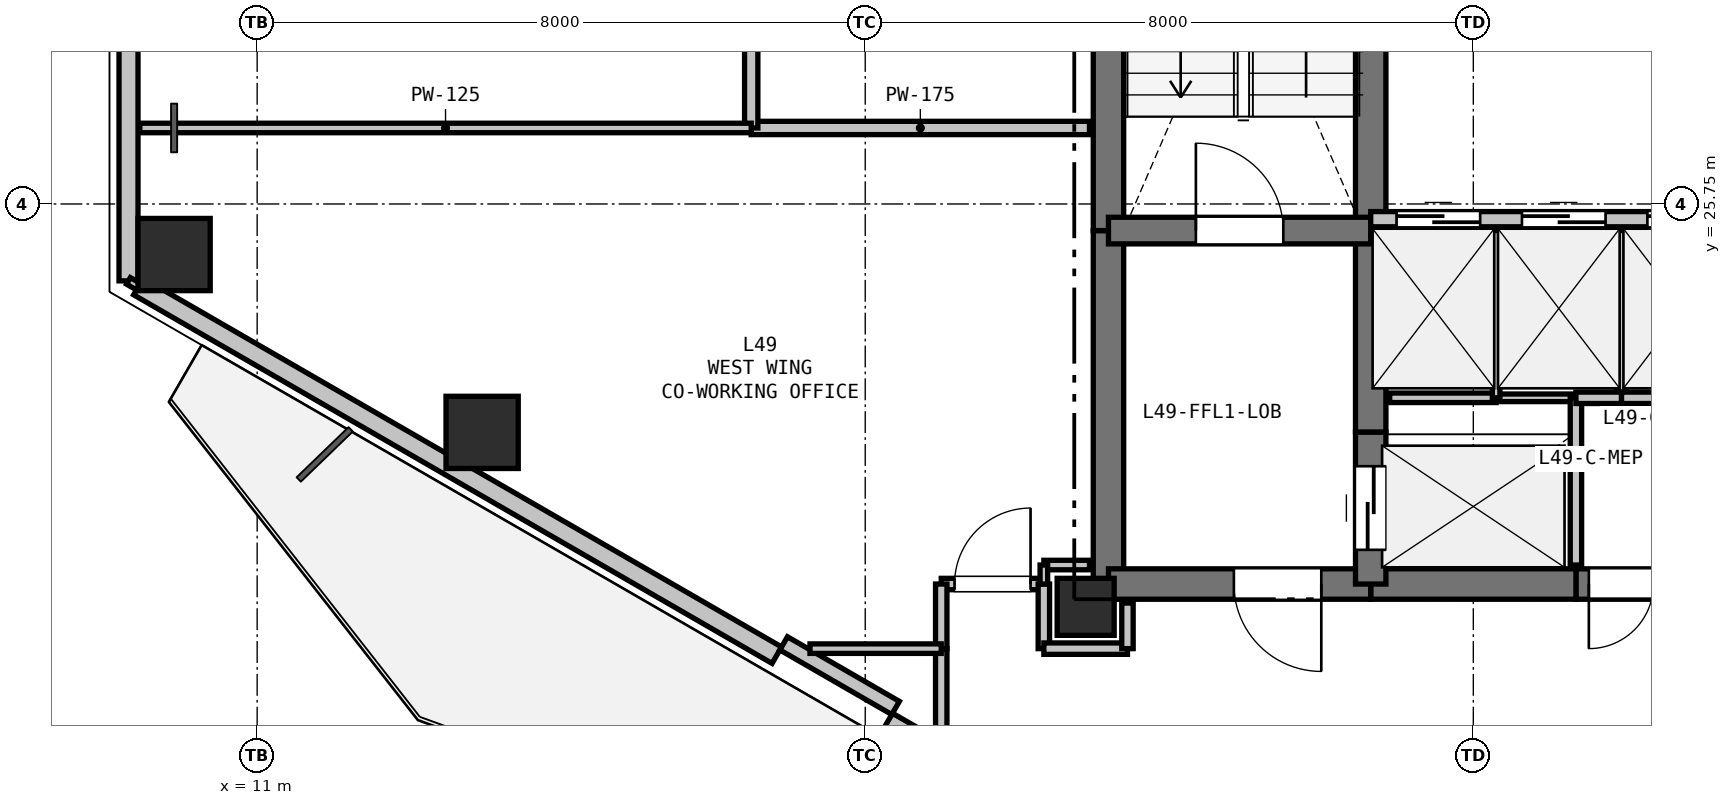
"""IFC4 building model, lengths in metres.
Left out: names, types, materials, properties, quantities, classifications, styles, units other than length and angle.
Written with IfcOpenShell. Run it as: python <this file> out.ifc"""

import sys

from ifc_helpers import new_model, si_unit, direction, frame, frame_2d, origin, origin_2d, place, context, subcontext, project, spatial, rectangle, hollow_rectangle, extrude, element, fill, save


model = new_model("IFC4")
c1 = context("Model", 3, precision=1e-05, world=origin(), true_north=direction((0.0, 1.0)))
c2 = subcontext(c1, "Body", "Model", "MODEL_VIEW")
j1 = project(units=[si_unit("LENGTHUNIT", "METRE"), si_unit("PLANEANGLEUNIT", "RADIAN")], contexts=[c1])
p1 = place(None, origin())
s1 = spatial("IfcSite", under=j1, at=p1, CompositionType="ELEMENT")
p2 = place(p1, origin())
s2 = spatial("IfcBuilding", under=s1, at=p2, CompositionType="ELEMENT")
p3 = place(p2, frame((0.0, 0.0, 178.8)))
s3 = spatial("IfcBuildingStorey", under=s2, at=p3, CompositionType="ELEMENT", Elevation=178.8)
p4 = place(p3, frame((21.9, 20.45, 0.0), z_axis=(0.0, 0.0, 1.0), x_axis=(1.0, 0.0, 0.0)))
e1 = element("IfcColumn", 1, at=p4, inside=s3, PredefinedType="COLUMN", context=c2, shape_type="SweptSolid", body=[
    extrude(rectangle(XDim=0.75, YDim=0.75, at=origin_2d()), origin(), (0.0, 0.0, 1.0), 3.3),
])
for number, where, z_axis, x_axis in (
    (2, (13.96, 22.745, 0.0), (0.0, 0.0, 1.0), (1.0, 0.0, 0.0)),
    (3, (9.907, 25.085, 0.0), (0.0, 0.0, 1.0), (1.0, 0.0, 0.0)),
):
    element("IfcColumn", number, at=place(p3, frame(where, z_axis=z_axis, x_axis=x_axis)), inside=s3, PredefinedType="COLUMN", context=c2, shape_type="SweptSolid", body=[
        extrude(hollow_rectangle(XDim=0.95, YDim=0.95, WallThickness=0.028, at=origin_2d()), origin(), (0.0, 0.0, 1.0), 3.3),
    ])
p5 = place(p3, frame((9.308, 24.738, 0.0), z_axis=(0.0, 0.0, 1.0), x_axis=(0.0, 1.0, 0.0)))
e4 = element("IfcWall", 4, at=p5, inside=s3, PredefinedType="SOLIDWALL", context=c2, shape_type="SweptSolid", body=[
    extrude(rectangle(XDim=4.023, YDim=0.25, at=frame_2d((2.012, 0.0))), origin(), (0.0, 0.0, 1.0), 2.69),
])
p6 = place(p3, frame((27.102, 14.464, 0.0), z_axis=(0.0, 0.0, 1.0), x_axis=(-0.866020680503, 0.500008180874, 0.0)))
e5 = element("IfcWall", 5, at=p6, inside=s3, PredefinedType="PARAPET", context=c2, shape_type="SweptSolid", body=[
    extrude(rectangle(XDim=8.999, YDim=0.2, at=frame_2d((4.5, 0.0))), origin(), (0.0, 0.0, 1.0), 0.2),
])
p7 = place(p3, frame((17.837, 19.814, 0.0), z_axis=(0.0, 0.0, 1.0), x_axis=(-0.866027133173, 0.499997004599, 0.0)))
e6 = element("IfcWall", 6, at=p7, inside=s3, PredefinedType="SOLIDWALL", context=c2, shape_type="SweptSolid", body=[
    extrude(rectangle(XDim=9.699, YDim=0.25, at=frame_2d((4.849, 0.0))), origin(), (0.0, 0.0, 1.0), 2.69),
])
p8 = place(p3, frame((19.399, 19.12, 0.0), z_axis=(0.0, 0.0, 1.0), x_axis=(-0.86605165483, 0.499954529098, 0.0)))
e7 = element("IfcWall", 7, at=p8, inside=s3, PredefinedType="PARAPET", context=c2, shape_type="SweptSolid", body=[
    extrude(rectangle(XDim=1.7, YDim=0.2, at=frame_2d((0.85, 0.0))), origin(), (0.0, 0.0, 1.0), 2.69),
])
p9 = place(p3, frame((22.2, 20.75, 0.0), z_axis=(0.0, 0.0, 1.0), x_axis=(0.0, 1.0, 0.0)))
e8 = element("IfcWall", 8, at=p9, inside=s3, PredefinedType="SHEAR", context=c2, shape_type="SweptSolid", body=[
    extrude(rectangle(XDim=4.65, YDim=0.4, at=frame_2d((2.325, 0.0))), origin(), (0.0, 0.0, 1.0), 3.07),
])
p10 = place(p3, frame((22.2, 25.4, 0.0), z_axis=(0.0, 0.0, 1.0), x_axis=(0.0, 1.0, 0.0)))
e9 = element("IfcWall", 9, at=p10, inside=s3, PredefinedType="SHEAR", context=c2, shape_type="SweptSolid", body=[
    extrude(rectangle(XDim=7.35, YDim=0.4, at=frame_2d((3.675, 0.0))), origin(), (0.0, 0.0, 1.0), 3.07),
])
p11 = place(p3, frame((30.6, 20.75, 0.0), z_axis=(0.0, 0.0, 1.0), x_axis=(-1.0, 0.0, 0.0)))
e10 = element("IfcWall", 10, at=p11, inside=s3, PredefinedType="SHEAR", context=c2, shape_type="SweptSolid", body=[
    extrude(rectangle(XDim=2.25, YDim=0.4, at=frame_2d((1.125, 0.0))), origin(), (0.0, 0.0, 1.0), 3.07),
])
p12 = place(p11, frame((1.23, 0.0, 0.0)))
e11 = element("IfcOpeningElement", 11, at=p12, cuts=e10, PredefinedType="OPENING", context=c2, shape_type="SweptSolid", body=[
    extrude(rectangle(XDim=0.85, YDim=2.1, at=frame_2d((0.425, 1.05))), frame((0.0, 0.21, 0.0), z_axis=(0.0, -1.0, 0.0), x_axis=(1.0, 0.0, 0.0)), (0.0, 0.0, 1.0), 0.42),
])
p13 = place(p11, frame((0.145, 0.0, 0.0)))
e12 = element("IfcOpeningElement", 12, at=p13, cuts=e10, PredefinedType="OPENING", context=c2, shape_type="SweptSolid", body=[
    extrude(rectangle(XDim=0.85, YDim=2.1, at=frame_2d((0.425, 1.05))), frame((0.0, 0.21, 0.0), z_axis=(0.0, -1.0, 0.0), x_axis=(1.0, 0.0, 0.0)), (0.0, 0.0, 1.0), 0.42),
])
p14 = place(p3, frame((28.35, 20.75, 0.0), z_axis=(0.0, 0.0, 1.0), x_axis=(-1.0, 0.0, 0.0)))
e13 = element("IfcWall", 13, at=p14, inside=s3, PredefinedType="SHEAR", context=c2, shape_type="SweptSolid", body=[
    extrude(rectangle(XDim=2.7, YDim=0.4, at=frame_2d((1.35, 0.0))), origin(), (0.0, 0.0, 1.0), 3.07),
])
p15 = place(p3, frame((25.65, 20.75, 0.0), z_axis=(0.0, 0.0, 1.0), x_axis=(-1.0, 0.0, 0.0)))
e14 = element("IfcWall", 14, at=p15, inside=s3, PredefinedType="SHEAR", context=c2, shape_type="SweptSolid", body=[
    extrude(rectangle(XDim=3.45, YDim=0.4, at=frame_2d((1.725, 0.0))), origin(), (0.0, 0.0, 1.0), 3.07),
])
p16 = place(p15, frame((0.65, 0.0, 0.0)))
e15 = element("IfcOpeningElement", 15, at=p16, cuts=e14, PredefinedType="OPENING", context=c2, shape_type="SweptSolid", body=[
    extrude(rectangle(XDim=1.15, YDim=2.15, at=frame_2d((0.575, 1.075))), frame((0.0, 0.21, 0.0), z_axis=(0.0, -1.0, 0.0), x_axis=(1.0, 0.0, 0.0)), (0.0, 0.0, 1.0), 0.42),
])
p17 = place(p3, frame((25.65, 20.75, 0.0), z_axis=(0.0, 0.0, 1.0), x_axis=(0.0, 1.0, 0.0)))
e16 = element("IfcWall", 16, at=p17, inside=s3, PredefinedType="SHEAR", context=c2, shape_type="SweptSolid", body=[
    extrude(rectangle(XDim=2.0, YDim=0.4, at=frame_2d((1.0, 0.0))), origin(), (0.0, 0.0, 1.0), 3.07),
])
p18 = place(p17, frame((0.45, 0.0, 0.0)))
e17 = element("IfcOpeningElement", 17, at=p18, cuts=e16, PredefinedType="OPENING", context=c2, shape_type="SweptSolid", body=[
    extrude(rectangle(XDim=1.1, YDim=2.15, at=frame_2d((0.55, 1.075))), frame((0.0, 0.21, 0.0), z_axis=(0.0, -1.0, 0.0), x_axis=(1.0, 0.0, 0.0)), (0.0, 0.0, 1.0), 0.42),
])
p19 = place(p3, frame((25.65, 22.75, 0.0), z_axis=(0.0, 0.0, 1.0), x_axis=(0.0, 1.0, 0.0)))
e18 = element("IfcWall", 18, at=p19, inside=s3, PredefinedType="SHEAR", context=c2, shape_type="SweptSolid", body=[
    extrude(rectangle(XDim=2.8, YDim=0.4, at=frame_2d((1.4, 0.0))), origin(), (0.0, 0.0, 1.0), 3.07),
])
p20 = place(p3, frame((25.65, 25.55, 0.0), z_axis=(0.0, 0.0, 1.0), x_axis=(0.0, 1.0, 0.0)))
e19 = element("IfcWall", 19, at=p20, inside=s3, PredefinedType="SHEAR", context=c2, shape_type="SweptSolid", body=[
    extrude(rectangle(XDim=2.4, YDim=0.4, at=frame_2d((1.2, 0.0))), origin(), (0.0, 0.0, 1.0), 3.07),
])
p21 = place(p3, frame((22.2, 25.4, 0.0), z_axis=(0.0, 0.0, 1.0), x_axis=(1.0, 0.0, 0.0)))
e20 = element("IfcWall", 20, at=p21, inside=s3, PredefinedType="SHEAR", context=c2, shape_type="SweptSolid", body=[
    extrude(rectangle(XDim=3.45, YDim=0.35, at=frame_2d((1.725, 0.0))), origin(), (0.0, 0.0, 1.0), 3.07),
])
p22 = place(p21, frame((1.15, 0.0, 0.0)))
e21 = element("IfcOpeningElement", 21, at=p22, cuts=e20, PredefinedType="OPENING", context=c2, shape_type="SweptSolid", body=[
    extrude(rectangle(XDim=1.15, YDim=2.15, at=frame_2d((0.575, 1.075))), frame((0.0, 0.185, 0.0), z_axis=(0.0, -1.0, 0.0), x_axis=(1.0, 0.0, 0.0)), (0.0, 0.0, 1.0), 0.37),
])
p23 = place(p3, frame((25.65, 25.55, 0.0), z_axis=(0.0, 0.0, 1.0), x_axis=(1.0, 0.0, 0.0)))
e22 = element("IfcWall", 22, at=p23, inside=s3, PredefinedType="PARTITIONING", context=c2, shape_type="SweptSolid", body=[
    extrude(rectangle(XDim=4.95, YDim=0.2, at=frame_2d((2.475, 0.0))), origin(), (0.0, 0.0, 1.0), 3.07),
])
p24 = place(p23, frame((0.34, 0.0, 0.0)))
e23 = element("IfcOpeningElement", 23, at=p24, cuts=e22, PredefinedType="OPENING", context=c2, shape_type="SweptSolid", body=[
    extrude(rectangle(XDim=1.1, YDim=2.15, at=frame_2d((0.55, 1.075))), frame((0.0, 0.11, 0.0), z_axis=(0.0, -1.0, 0.0), x_axis=(1.0, 0.0, 0.0)), (0.0, 0.0, 1.0), 0.22),
])
p25 = place(p23, frame((1.99, 0.0, 0.0)))
e24 = element("IfcOpeningElement", 24, at=p25, cuts=e22, PredefinedType="OPENING", context=c2, shape_type="SweptSolid", body=[
    extrude(rectangle(XDim=1.1, YDim=2.15, at=frame_2d((0.55, 1.075))), frame((0.0, 0.11, 0.0), z_axis=(0.0, -1.0, 0.0), x_axis=(1.0, 0.0, 0.0)), (0.0, 0.0, 1.0), 0.22),
])
p26 = place(p23, frame((3.64, 0.0, 0.0)))
e25 = element("IfcOpeningElement", 25, at=p26, cuts=e22, PredefinedType="OPENING", context=c2, shape_type="SweptSolid", body=[
    extrude(rectangle(XDim=1.1, YDim=2.15, at=frame_2d((0.55, 1.075))), frame((0.0, 0.11, 0.0), z_axis=(0.0, -1.0, 0.0), x_axis=(1.0, 0.0, 0.0)), (0.0, 0.0, 1.0), 0.22),
])
p27 = place(p3, frame((25.9, 23.2, 0.0), z_axis=(0.0, 0.0, 1.0), x_axis=(1.0, 0.0, 0.0)))
e26 = element("IfcWall", 26, at=p27, inside=s3, PredefinedType="PARTITIONING", context=c2, shape_type="SweptSolid", body=[
    extrude(rectangle(XDim=1.4, YDim=0.125, at=frame_2d((0.7, 0.0))), origin(), (0.0, 0.0, 1.0), 3.07),
])
p28 = place(p3, frame((27.3, 23.2, 0.0), z_axis=(0.0, 0.0, 1.0), x_axis=(1.0, 0.0, 0.0)))
e27 = element("IfcWall", 27, at=p28, inside=s3, PredefinedType="PARTITIONING", context=c2, shape_type="SweptSolid", body=[
    extrude(rectangle(XDim=1.05, YDim=0.1, at=frame_2d((0.525, 0.0))), origin(), (0.0, 0.0, 1.0), 3.07),
])
p29 = place(p3, frame((28.35, 23.2, 0.0), z_axis=(0.0, 0.0, 1.0), x_axis=(0.0, -1.0, 0.0)))
e28 = element("IfcWall", 28, at=p29, inside=s3, PredefinedType="PARTITIONING", context=c2, shape_type="SweptSolid", body=[
    extrude(rectangle(XDim=2.2, YDim=0.15, at=frame_2d((1.1, 0.0))), origin(), (0.0, 0.0, 1.0), 3.07),
])
p30 = place(p3, frame((27.3, 25.4, 0.0), z_axis=(0.0, 0.0, 1.0), x_axis=(0.0, -1.0, 0.0)))
e29 = element("IfcWall", 29, at=p30, inside=s3, PredefinedType="PARTITIONING", context=c2, shape_type="SweptSolid", body=[
    extrude(rectangle(XDim=2.2, YDim=0.1, at=frame_2d((1.1, 0.0))), origin(), (0.0, 0.0, 1.0), 3.07),
])
p31 = place(p3, frame((28.95, 25.4, 0.0), z_axis=(0.0, 0.0, 1.0), x_axis=(0.0, -1.0, 0.0)))
e30 = element("IfcWall", 30, at=p31, inside=s3, PredefinedType="PARTITIONING", context=c2, shape_type="SweptSolid", body=[
    extrude(rectangle(XDim=2.2, YDim=0.125, at=frame_2d((1.1, 0.0))), origin(), (0.0, 0.0, 1.0), 3.07),
])
p32 = place(p3, frame((28.95, 23.2, 0.0), z_axis=(0.0, 0.0, 1.0), x_axis=(-1.0, 0.0, 0.0)))
e31 = element("IfcWall", 31, at=p32, inside=s3, PredefinedType="PARTITIONING", context=c2, shape_type="SweptSolid", body=[
    extrude(rectangle(XDim=0.6, YDim=0.15, at=frame_2d((0.3, 0.0))), origin(), (0.0, 0.0, 1.0), 3.07),
])
p33 = place(p3, frame((29.5, 23.2, 0.0), z_axis=(0.0, 0.0, 1.0), x_axis=(-1.0, 0.0, 0.0)))
e32 = element("IfcWall", 32, at=p33, inside=s3, PredefinedType="PARTITIONING", context=c2, shape_type="SweptSolid", body=[
    extrude(rectangle(XDim=0.55, YDim=0.15, at=frame_2d((0.275, 0.0))), origin(), (0.0, 0.0, 1.0), 3.07),
])
p34 = place(p3, frame((20.0, 20.75, 0.0), z_axis=(0.0, 0.0, 1.0), x_axis=(1.0, 0.0, 0.0)))
e33 = element("IfcWall", 33, at=p34, inside=s3, PredefinedType="PARTITIONING", context=c2, shape_type="SweptSolid", body=[
    extrude(rectangle(XDim=1.35, YDim=0.15, at=frame_2d((0.675, 0.0))), origin(), (0.0, 0.0, 1.0), 2.518),
])
p35 = place(p34, frame((0.175, 0.0, 0.0)))
e34 = element("IfcOpeningElement", 34, at=p35, cuts=e33, PredefinedType="OPENING", context=c2, shape_type="SweptSolid", body=[
    extrude(rectangle(XDim=1.0, YDim=2.15, at=frame_2d((0.5, 1.075))), frame((0.0, 0.085, 0.0), z_axis=(0.0, -1.0, 0.0), x_axis=(1.0, 0.0, 0.0)), (0.0, 0.0, 1.0), 0.17),
])
p36 = place(p3, frame((21.35, 20.75, 0.0), z_axis=(0.0, 0.0, 1.0), x_axis=(0.0, -1.0, 0.0)))
e35 = element("IfcWall", 35, at=p36, inside=s3, PredefinedType="PARTITIONING", context=c2, shape_type="SweptSolid", body=[
    extrude(rectangle(XDim=0.85, YDim=0.15, at=frame_2d((0.425, 0.0))), origin(), (0.0, 0.0, 1.0), 2.518),
])
p37 = place(p3, frame((21.35, 19.9, 0.0), z_axis=(0.0, 0.0, 1.0), x_axis=(1.0, 0.0, 0.0)))
e36 = element("IfcWall", 36, at=p37, inside=s3, PredefinedType="PARTITIONING", context=c2, shape_type="SweptSolid", body=[
    extrude(rectangle(XDim=1.1, YDim=0.15, at=frame_2d((0.55, 0.0))), origin(), (0.0, 0.0, 1.0), 2.518),
])
p38 = place(p3, frame((22.45, 19.9, 0.0), z_axis=(0.0, 0.0, 1.0), x_axis=(0.0, 1.0, 0.0)))
e37 = element("IfcWall", 37, at=p38, inside=s3, PredefinedType="PARTITIONING", context=c2, shape_type="SweptSolid", body=[
    extrude(rectangle(XDim=0.6, YDim=0.15, at=frame_2d((0.3, 0.0))), origin(), (0.0, 0.0, 1.0), 2.518),
])
p39 = place(p3, frame((20.0, 18.609, 0.0), z_axis=(0.0, 0.0, 1.0), x_axis=(0.0, 1.0, 0.0)))
e38 = element("IfcWall", 38, at=p39, inside=s3, PredefinedType="PARTITIONING", context=c2, shape_type="SweptSolid", body=[
    extrude(rectangle(XDim=1.291, YDim=0.15, at=frame_2d((0.646, 0.0))), origin(), (0.0, 0.0, 1.0), 2.365),
])
p40 = place(p3, frame((20.0, 19.9, 0.0), z_axis=(0.0, 0.0, 1.0), x_axis=(0.0, 1.0, 0.0)))
e39 = element("IfcWall", 39, at=p40, inside=s3, PredefinedType="PARTITIONING", context=c2, shape_type="SweptSolid", body=[
    extrude(rectangle(XDim=0.85, YDim=0.15, at=frame_2d((0.425, 0.0))), origin(), (0.0, 0.0, 1.0), 3.07),
])
p41 = place(p3, frame((21.95, 26.75, 0.0), z_axis=(0.0, 0.0, 1.0), x_axis=(-1.0, 0.0, 0.0)))
e40 = element("IfcWall", 40, at=p41, inside=s3, PredefinedType="PLUMBINGWALL", context=c2, shape_type="SweptSolid", body=[
    extrude(rectangle(XDim=4.45, YDim=0.175, at=frame_2d((2.225, 0.0))), origin(), (0.0, 0.0, 1.0), 2.595),
])
p42 = place(p3, frame((17.5, 26.75, 0.0), z_axis=(0.0, 0.0, 1.0), x_axis=(0.0, 1.0, 0.0)))
e41 = element("IfcWall", 41, at=p42, inside=s3, PredefinedType="PLUMBINGWALL", context=c2, shape_type="SweptSolid", body=[
    extrude(rectangle(XDim=6.57, YDim=0.175, at=frame_2d((3.285, 0.0))), origin(), (0.0, 0.0, 1.0), 2.365),
])
p43 = place(p42, frame((2.835, 0.0, 0.0)))
e42 = element("IfcOpeningElement", 42, at=p43, cuts=e41, PredefinedType="OPENING", context=c2, shape_type="SweptSolid", body=[
    extrude(rectangle(XDim=0.9, YDim=2.1, at=frame_2d((0.45, 1.05))), frame((0.0, 0.097, 0.0), z_axis=(0.0, -1.0, 0.0), x_axis=(1.0, 0.0, 0.0)), (0.0, 0.0, 1.0), 0.195),
])
p44 = place(p3, frame((17.5, 26.75, 0.0), z_axis=(0.0, 0.0, 1.0), x_axis=(-1.0, 0.0, 0.0)))
e43 = element("IfcWall", 43, at=p44, inside=s3, PredefinedType="PARTITIONING", context=c2, shape_type="SweptSolid", body=[
    extrude(rectangle(XDim=8.043, YDim=0.125, at=frame_2d((4.022, 0.0))), origin(), (0.0, 0.0, 1.0), 2.734),
])
p45 = place(p3, frame((21.95, 21.0, 0.0), z_axis=(0.0, 0.0, 1.0), x_axis=(-1.0, 0.0, 0.0)))
e44 = element("IfcWall", 44, at=p45, inside=s3, PredefinedType="PARTITIONING", context=c2, shape_type="SweptSolid", body=[
    extrude(rectangle(XDim=0.6, YDim=0.125, at=frame_2d((0.3, 0.0))), origin(), (0.0, 0.0, 1.0), 2.595),
])
p46 = place(p3, frame((21.35, 21.0, 0.0), z_axis=(0.0, 0.0, 1.0), x_axis=(0.0, -1.0, 0.0)))
e45 = element("IfcWall", 45, at=p46, inside=s3, PredefinedType="PARTITIONING", context=c2, shape_type="SweptSolid", body=[
    extrude(rectangle(XDim=0.25, YDim=0.1, at=frame_2d((0.125, 0.0))), origin(), (0.0, 0.0, 1.0), 2.518),
])
p47 = place(p3, frame((20.0, 19.9, 0.0), z_axis=(0.0, 0.0, 1.0), x_axis=(-1.0, 0.0, 0.0)))
e46 = element("IfcWall", 46, at=p47, inside=s3, PredefinedType="PARTITIONING", context=c2, shape_type="SweptSolid", body=[
    extrude(rectangle(XDim=1.727, YDim=0.125, at=frame_2d((0.863, 0.0))), origin(), (0.0, 0.0, 1.0), 2.365),
])
p48 = place(p3, frame((9.437, 24.663, 0.0), z_axis=(0.0, 0.0, 1.0), x_axis=(-0.866239593359, 0.499628829129, 0.0)))
e47 = element("IfcWall", 47, at=p48, inside=s3, PredefinedType="PARTITIONING", context=c2, shape_type="SweptSolid", body=[
    extrude(rectangle(XDim=0.15, YDim=0.1, at=frame_2d((0.075, 0.0))), origin(), (0.0, 0.0, 1.0), 3.07),
])
p49 = place(p24, origin())
e48 = element("IfcDoor", 48, at=p49, inside=s3, OperationType="SLIDING_TO_LEFT", PredefinedType="DOOR", context=c2, shape_type="SweptSolid", body=[
    extrude(rectangle(XDim=1.1, YDim=2.15, at=frame_2d((0.55, 1.075))), frame((0.0, 0.025, 0.0), z_axis=(0.0, -1.0, 0.0), x_axis=(1.0, 0.0, 0.0)), (0.0, 0.0, 1.0), 0.05),
])
fill(e23, e48)
p50 = place(p25, origin())
e49 = element("IfcDoor", 49, at=p50, inside=s3, OperationType="SLIDING_TO_LEFT", PredefinedType="DOOR", context=c2, shape_type="SweptSolid", body=[
    extrude(rectangle(XDim=1.1, YDim=2.15, at=frame_2d((0.55, 1.075))), frame((0.0, 0.025, 0.0), z_axis=(0.0, -1.0, 0.0), x_axis=(1.0, 0.0, 0.0)), (0.0, 0.0, 1.0), 0.05),
])
fill(e24, e49)
p51 = place(p26, origin())
e50 = element("IfcDoor", 50, at=p51, inside=s3, OperationType="SLIDING_TO_LEFT", PredefinedType="DOOR", context=c2, shape_type="SweptSolid", body=[
    extrude(rectangle(XDim=1.1, YDim=2.15, at=frame_2d((0.55, 1.075))), frame((0.0, 0.025, 0.0), z_axis=(0.0, -1.0, 0.0), x_axis=(1.0, 0.0, 0.0)), (0.0, 0.0, 1.0), 0.05),
])
fill(e25, e50)
p52 = place(p18, origin())
e51 = element("IfcDoor", 51, at=p52, inside=s3, OperationType="SLIDING_TO_LEFT", PredefinedType="DOOR", context=c2, shape_type="SweptSolid", body=[
    extrude(rectangle(XDim=1.1, YDim=2.15, at=frame_2d((0.55, 1.075))), frame((0.0, 0.025, 0.0), z_axis=(0.0, -1.0, 0.0), x_axis=(1.0, 0.0, 0.0)), (0.0, 0.0, 1.0), 0.05),
])
fill(e17, e51)
p53 = place(p22, origin())
e52 = element("IfcDoor", 52, at=p53, inside=s3, OperationType="SINGLE_SWING_LEFT", PredefinedType="DOOR", context=c2, shape_type="SweptSolid", body=[
    extrude(rectangle(XDim=1.15, YDim=2.15, at=frame_2d((0.575, 1.075))), frame((0.0, 0.025, 0.0), z_axis=(0.0, -1.0, 0.0), x_axis=(1.0, 0.0, 0.0)), (0.0, 0.0, 1.0), 0.05),
])
fill(e21, e52)
p54 = place(p16, origin())
e53 = element("IfcDoor", 53, at=p54, inside=s3, OperationType="SINGLE_SWING_LEFT", PredefinedType="DOOR", context=c2, shape_type="SweptSolid", body=[
    extrude(rectangle(XDim=1.15, YDim=2.15, at=frame_2d((0.575, 1.075))), frame((0.0, 0.025, 0.0), z_axis=(0.0, -1.0, 0.0), x_axis=(1.0, 0.0, 0.0)), (0.0, 0.0, 1.0), 0.05),
])
fill(e15, e53)
p55 = place(p12, origin())
e54 = element("IfcDoor", 54, at=p55, inside=s3, OperationType="SINGLE_SWING_RIGHT", PredefinedType="DOOR", context=c2, shape_type="SweptSolid", body=[
    extrude(rectangle(XDim=0.85, YDim=2.1, at=frame_2d((0.425, 1.05))), frame((0.0, 0.025, 0.0), z_axis=(0.0, -1.0, 0.0), x_axis=(1.0, 0.0, 0.0)), (0.0, 0.0, 1.0), 0.05),
])
fill(e11, e54)
p56 = place(p35, origin())
e55 = element("IfcDoor", 55, at=p56, inside=s3, OperationType="SINGLE_SWING_RIGHT", PredefinedType="DOOR", context=c2, shape_type="SweptSolid", body=[
    extrude(rectangle(XDim=1.0, YDim=2.15, at=frame_2d((0.5, 1.075))), frame((0.0, 0.025, 0.0), z_axis=(0.0, -1.0, 0.0), x_axis=(1.0, 0.0, 0.0)), (0.0, 0.0, 1.0), 0.05),
])
fill(e34, e55)
save(model, sys.argv[1])
